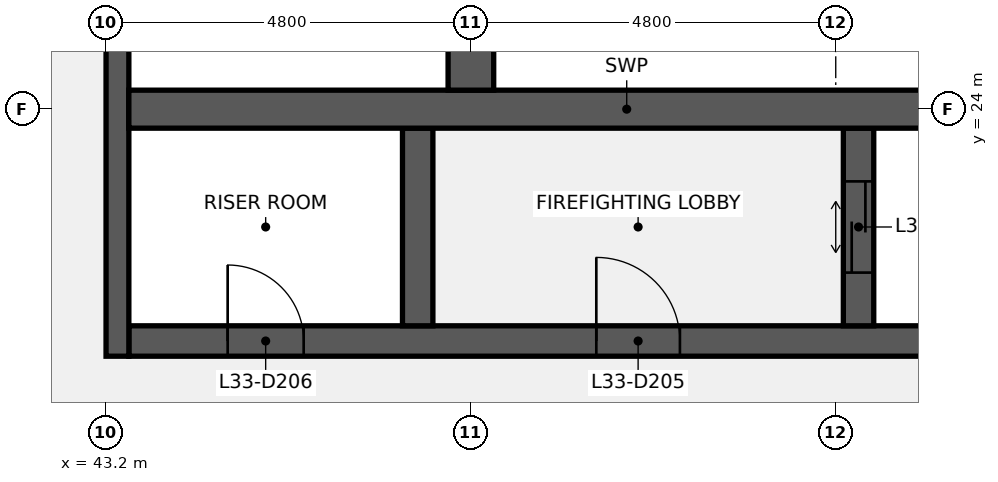
"""IFC4 building model, lengths in metres.
Left out: names, types, materials, properties, quantities, classifications, styles, units other than length and angle.
Written with IfcOpenShell. Run it as: python <this file> out.ifc"""

import sys

from ifc_helpers import new_model, si_unit, direction, frame, frame_2d, origin, place, context, subcontext, project, spatial, rectangle, extrude, element, fill, save


model = new_model("IFC4")
c1 = context("Model", 3, precision=1e-05, world=origin(), true_north=direction((0.0, 1.0)))
c2 = subcontext(c1, "Body", "Model", "MODEL_VIEW")
j1 = project(units=[si_unit("LENGTHUNIT", "METRE"), si_unit("PLANEANGLEUNIT", "RADIAN")], contexts=[c1])
p1 = place(None, origin())
s1 = spatial("IfcSite", under=j1, at=p1, CompositionType="ELEMENT")
p2 = place(p1, origin())
s2 = spatial("IfcBuilding", under=s1, at=p2, CompositionType="ELEMENT")
p3 = place(p2, frame((0.0, 0.0, 152.1)))
s3 = spatial("IfcBuildingStorey", under=s2, at=p3, CompositionType="ELEMENT", Elevation=152.1)
p4 = place(p3, frame((43.5, 20.95, 0.0), z_axis=(0.0, 0.0, 1.0), x_axis=(1.0, 0.0, 0.0)))
e1 = element("IfcWall", 1, at=p4, inside=s3, PredefinedType="SHEAR", context=c2, shape_type="SweptSolid", body=[
    extrude(rectangle(XDim=13.1, YDim=0.4, at=frame_2d((6.55, 0.0))), origin(), (0.0, 0.0, 1.0), 3.84),
])
p5 = place(p4, frame((6.15, 0.0, 0.0)))
e2 = element("IfcOpeningElement", 2, at=p5, cuts=e1, PredefinedType="OPENING", context=c2, shape_type="SweptSolid", body=[
    extrude(rectangle(XDim=1.1, YDim=2.1, at=frame_2d((0.55, 1.05))), frame((0.0, 0.21, 0.0), z_axis=(0.0, -1.0, 0.0), x_axis=(1.0, 0.0, 0.0)), (0.0, 0.0, 1.0), 0.42),
])
p6 = place(p4, frame((1.3, 0.0, 0.0)))
e3 = element("IfcOpeningElement", 3, at=p6, cuts=e1, PredefinedType="OPENING", context=c2, shape_type="SweptSolid", body=[
    extrude(rectangle(XDim=1.0, YDim=2.1, at=frame_2d((0.5, 1.05))), frame((0.0, 0.21, 0.0), z_axis=(0.0, -1.0, 0.0), x_axis=(1.0, 0.0, 0.0)), (0.0, 0.0, 1.0), 0.42),
])
p7 = place(p3, frame((43.35, 20.75, 0.0), z_axis=(0.0, 0.0, 1.0), x_axis=(0.0, 1.0, 0.0)))
e4 = element("IfcWall", 4, at=p7, inside=s3, PredefinedType="SHEAR", context=c2, shape_type="SweptSolid", body=[
    extrude(rectangle(XDim=6.5, YDim=0.3, at=frame_2d((3.25, 0.0))), origin(), (0.0, 0.0, 1.0), 3.84),
])
p8 = place(p3, frame((53.1, 21.15, 0.0), z_axis=(0.0, 0.0, 1.0), x_axis=(0.0, 1.0, 0.0)))
e5 = element("IfcWall", 5, at=p8, inside=s3, PredefinedType="SHEAR", context=c2, shape_type="SweptSolid", body=[
    extrude(rectangle(XDim=2.6, YDim=0.4, at=frame_2d((1.3, 0.0))), origin(), (0.0, 0.0, 1.0), 3.84),
])
p9 = place(p8, frame((0.7, 0.0, 0.0)))
e6 = element("IfcOpeningElement", 6, at=p9, cuts=e5, PredefinedType="OPENING", context=c2, shape_type="SweptSolid", body=[
    extrude(rectangle(XDim=1.2, YDim=2.1, at=frame_2d((0.6, 1.05))), frame((0.0, 0.21, 0.0), z_axis=(0.0, -1.0, 0.0), x_axis=(1.0, 0.0, 0.0)), (0.0, 0.0, 1.0), 0.42),
])
p10 = place(p3, frame((47.3, 21.15, 0.0), z_axis=(0.0, 0.0, 1.0), x_axis=(0.0, 1.0, 0.0)))
e7 = element("IfcWall", 7, at=p10, inside=s3, PredefinedType="SHEAR", context=c2, shape_type="SweptSolid", body=[
    extrude(rectangle(XDim=2.6, YDim=0.4, at=frame_2d((1.3, 0.0))), origin(), (0.0, 0.0, 1.0), 3.84),
])
p11 = place(p3, frame((43.5, 24.0, 0.0), z_axis=(0.0, 0.0, 1.0), x_axis=(1.0, 0.0, 0.0)))
e8 = element("IfcWall", 8, at=p11, inside=s3, PredefinedType="SHEAR", context=c2, shape_type="SweptSolid", body=[
    extrude(rectangle(XDim=13.1, YDim=0.5, at=frame_2d((6.55, 0.0))), origin(), (0.0, 0.0, 1.0), 3.84),
])
p12 = place(p3, frame((48.0, 24.25, 0.0), z_axis=(0.0, 0.0, 1.0), x_axis=(0.0, 1.0, 0.0)))
e9 = element("IfcWall", 9, at=p12, inside=s3, PredefinedType="SHEAR", context=c2, shape_type="SweptSolid", body=[
    extrude(rectangle(XDim=2.6, YDim=0.6, at=frame_2d((1.3, 0.0))), origin(), (0.0, 0.0, 1.0), 3.84),
])
p13 = place(p5, origin())
e10 = element("IfcDoor", 10, at=p13, inside=s3, OperationType="SINGLE_SWING_LEFT", PredefinedType="DOOR", context=c2, shape_type="SweptSolid", body=[
    extrude(rectangle(XDim=1.1, YDim=2.1, at=frame_2d((0.55, 1.05))), frame((0.0, 0.025, 0.0), z_axis=(0.0, -1.0, 0.0), x_axis=(1.0, 0.0, 0.0)), (0.0, 0.0, 1.0), 0.05),
])
fill(e2, e10)
p14 = place(p6, origin())
e11 = element("IfcDoor", 11, at=p14, inside=s3, OperationType="SINGLE_SWING_LEFT", PredefinedType="DOOR", context=c2, shape_type="SweptSolid", body=[
    extrude(rectangle(XDim=1.0, YDim=2.1, at=frame_2d((0.5, 1.05))), frame((0.0, 0.025, 0.0), z_axis=(0.0, -1.0, 0.0), x_axis=(1.0, 0.0, 0.0)), (0.0, 0.0, 1.0), 0.05),
])
fill(e3, e11)
p15 = place(p9, origin())
e12 = element("IfcDoor", 12, at=p15, inside=s3, OperationType="DOUBLE_DOOR_SLIDING", PredefinedType="DOOR", context=c2, shape_type="SweptSolid", body=[
    extrude(rectangle(XDim=1.2, YDim=2.1, at=frame_2d((0.6, 1.05))), frame((0.0, 0.025, 0.0), z_axis=(0.0, -1.0, 0.0), x_axis=(1.0, 0.0, 0.0)), (0.0, 0.0, 1.0), 0.05),
])
fill(e6, e12)
save(model, sys.argv[1])
